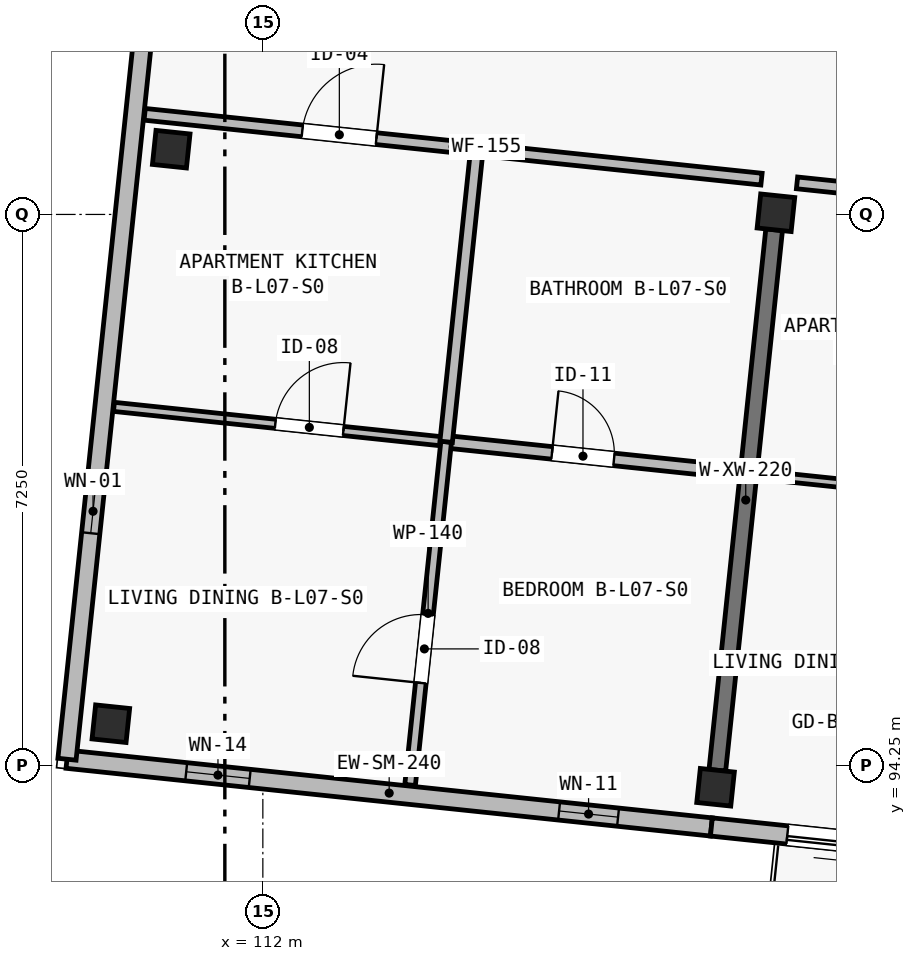
"""IFC4 building model, lengths in metres.
Left out: names, types, materials, properties, quantities, classifications, styles, units other than length and angle.
Written with IfcOpenShell. Run it as: python <this file> out.ifc"""

import sys

from ifc_helpers import new_model, si_unit, direction, frame, frame_2d, origin, origin_2d, place, context, subcontext, project, spatial, rectangle, extrude, element, fill, save


model = new_model("IFC4")
c1 = context("Model", 3, precision=1e-05, world=origin(), true_north=direction((0.0, 1.0)))
c2 = subcontext(c1, "Body", "Model", "MODEL_VIEW")
j1 = project(units=[si_unit("LENGTHUNIT", "METRE"), si_unit("PLANEANGLEUNIT", "RADIAN")], contexts=[c1])
p1 = place(None, origin())
s1 = spatial("IfcSite", under=j1, at=p1, CompositionType="ELEMENT")
p2 = place(p1, origin())
s2 = spatial("IfcBuilding", under=s1, at=p2, CompositionType="ELEMENT")
p3 = place(p2, frame((0.0, 0.0, 24.65)))
s3 = spatial("IfcBuildingStorey", under=s2, at=p3, CompositionType="ELEMENT", Elevation=24.65)
for number, where, z_axis, x_axis in (
    (1, (110.0, 94.8, 0.0), (0.0, 0.0, 1.0), (0.995, -0.105, 0.0)),
    (2, (110.794, 102.358, 0.0), (0.0, 0.0, 1.0), (0.995, -0.105, 0.0)),
    (3, (117.956, 93.964, 0.0), (0.0, 0.0, 1.0), (0.995, -0.105, 0.0)),
    (4, (118.75, 101.522, 0.0), (0.0, 0.0, 1.0), (0.995, -0.105, 0.0)),
):
    element("IfcColumn", number, at=place(p3, frame(where, z_axis=z_axis, x_axis=x_axis)), inside=s3, PredefinedType="COLUMN", context=c2, shape_type="SweptSolid", body=[
        extrude(rectangle(XDim=0.45, YDim=0.45, at=origin_2d()), origin(), (0.0, 0.0, 1.0), 3.25),
    ])
p4 = place(p3, frame((117.98, 94.188, 0.0), z_axis=(0.0, 0.0, 1.0), x_axis=(0.104519481265, 0.994522839374, 0.0)))
e5 = element("IfcWall", 5, at=p4, inside=s3, PredefinedType="SHEAR", context=c2, shape_type="SweptSolid", body=[
    extrude(rectangle(XDim=7.15, YDim=0.22, at=frame_2d((3.575, 0.0))), origin(), (0.0, 0.0, 1.0), 2.5),
])
p5 = place(p3, frame((117.901, 93.442, 0.0), z_axis=(0.0, 0.0, 1.0), x_axis=(-0.994521760736, 0.104529744196, 0.0)))
e6 = element("IfcWall", 6, at=p5, inside=s3, PredefinedType="SOLIDWALL", context=c2, shape_type="SweptSolid", body=[
    extrude(rectangle(XDim=8.525, YDim=0.24, at=frame_2d((4.262, 0.0))), origin(), (0.0, 0.0, 1.0), 3.0),
])
p6 = place(p5, frame((1.235, 0.0, 0.48)))
e7 = element("IfcOpeningElement", 7, at=p6, cuts=e6, PredefinedType="OPENING", context=c2, shape_type="SweptSolid", body=[
    extrude(rectangle(XDim=0.78, YDim=2.2, at=frame_2d((0.39, 1.1))), frame((0.0, 0.135, 0.0), z_axis=(0.0, -1.0, 0.0), x_axis=(1.0, 0.0, 0.0)), (0.0, 0.0, 1.0), 0.27),
])
p7 = place(p5, frame((6.108, 0.0, 0.48)))
e8 = element("IfcOpeningElement", 8, at=p7, cuts=e6, PredefinedType="OPENING", context=c2, shape_type="SweptSolid", body=[
    extrude(rectangle(XDim=0.84, YDim=2.28, at=frame_2d((0.42, 1.14))), frame((0.0, 0.135, 0.0), z_axis=(0.0, -1.0, 0.0), x_axis=(1.0, 0.0, 0.0)), (0.0, 0.0, 1.0), 0.27),
])
p8 = place(p3, frame((125.857, 92.605, 0.0), z_axis=(0.0, 0.0, 1.0), x_axis=(-0.994522329422, 0.104524333444, 0.0)))
e9 = element("IfcWall", 9, at=p8, inside=s3, PredefinedType="SOLIDWALL", context=c2, shape_type="SweptSolid", body=[
    extrude(rectangle(XDim=8.0, YDim=0.24, at=frame_2d((4.0, 0.0))), origin(), (0.0, 0.0, 1.0), 3.0),
])
p9 = place(p8, frame((5.495, 0.0, 0.0)))
e10 = element("IfcOpeningElement", 10, at=p9, cuts=e9, PredefinedType="OPENING", context=c2, shape_type="SweptSolid", body=[
    extrude(rectangle(XDim=1.5, YDim=2.12, at=frame_2d((0.75, 1.06))), frame((0.0, 0.135, 0.0), z_axis=(0.0, -1.0, 0.0), x_axis=(1.0, 0.0, 0.0)), (0.0, 0.0, 1.0), 0.27),
])
p10 = place(p8, frame((0.63, 0.0, 0.5)))
e11 = element("IfcOpeningElement", 11, at=p10, cuts=e9, PredefinedType="OPENING", context=c2, shape_type="SweptSolid", body=[
    extrude(rectangle(XDim=0.86, YDim=2.36, at=frame_2d((0.43, 1.18))), frame((0.0, 0.135, 0.0), z_axis=(0.0, -1.0, 0.0), x_axis=(1.0, 0.0, 0.0)), (0.0, 0.0, 1.0), 0.27),
])
p11 = place(p3, frame((109.423, 94.333, 0.0), z_axis=(0.0, 0.0, 1.0), x_axis=(0.1045253859, 0.994522218808, 0.0)))
e12 = element("IfcWall", 12, at=p11, inside=s3, PredefinedType="SOLIDWALL", context=c2, shape_type="SweptSolid", body=[
    extrude(rectangle(XDim=20.65, YDim=0.24, at=frame_2d((10.325, 0.0))), origin(), (0.0, 0.0, 1.0), 3.0),
])
p12 = place(p11, frame((2.99, 0.0, 0.52)))
e13 = element("IfcOpeningElement", 13, at=p12, cuts=e12, PredefinedType="OPENING", context=c2, shape_type="SweptSolid", body=[
    extrude(rectangle(XDim=0.58, YDim=2.16, at=frame_2d((0.29, 1.08))), frame((0.0, 0.135, 0.0), z_axis=(0.0, -1.0, 0.0), x_axis=(1.0, 0.0, 0.0)), (0.0, 0.0, 1.0), 0.27),
])
p13 = place(p11, frame((17.3, 0.0, 0.45)))
e14 = element("IfcOpeningElement", 14, at=p13, cuts=e12, PredefinedType="OPENING", context=c2, shape_type="SweptSolid", body=[
    extrude(rectangle(XDim=0.72, YDim=2.16, at=frame_2d((0.36, 1.08))), frame((0.0, 0.135, 0.0), z_axis=(0.0, -1.0, 0.0), x_axis=(1.0, 0.0, 0.0)), (0.0, 0.0, 1.0), 0.27),
])
p14 = place(p3, frame((110.446, 102.817, 0.0), z_axis=(0.0, 0.0, 1.0), x_axis=(0.994520852686, -0.104538383252, 0.0)))
e15 = element("IfcWall", 15, at=p14, inside=s3, PredefinedType="PARTITIONING", context=c2, shape_type="SweptSolid", body=[
    extrude(rectangle(XDim=8.16, YDim=0.155, at=frame_2d((4.08, 0.0))), origin(), (0.0, 0.0, 1.0), 2.97),
])
p15 = place(p14, frame((2.085, 0.0, 0.0)))
e16 = element("IfcOpeningElement", 16, at=p15, cuts=e15, PredefinedType="OPENING", context=c2, shape_type="SweptSolid", body=[
    extrude(rectangle(XDim=0.98, YDim=2.15, at=frame_2d((0.49, 1.075))), frame((0.0, 0.093, 0.0), z_axis=(0.0, -1.0, 0.0), x_axis=(1.0, 0.0, 0.0)), (0.0, 0.0, 1.0), 0.185),
])
p16 = place(p3, frame((110.041, 98.969, 0.0), z_axis=(0.0, 0.0, 1.0), x_axis=(0.99452005377, -0.104545983421, 0.0)))
e17 = element("IfcWall", 17, at=p16, inside=s3, PredefinedType="PARTITIONING", context=c2, shape_type="SweptSolid", body=[
    extrude(rectangle(XDim=4.395, YDim=0.12, at=frame_2d((2.198, 0.0))), origin(), (0.0, 0.0, 1.0), 2.97),
])
p17 = place(p16, frame((2.135, 0.0, 0.0)))
e18 = element("IfcOpeningElement", 18, at=p17, cuts=e17, PredefinedType="OPENING", context=c2, shape_type="SweptSolid", body=[
    extrude(rectangle(XDim=0.9, YDim=2.1, at=frame_2d((0.45, 1.05))), frame((0.0, 0.075, 0.0), z_axis=(0.0, -1.0, 0.0), x_axis=(1.0, 0.0, 0.0)), (0.0, 0.0, 1.0), 0.15),
])
p18 = place(p3, frame((114.412, 98.509, 0.0), z_axis=(0.0, 0.0, 1.0), x_axis=(0.994524375082, -0.104504867671, 0.0)))
e19 = element("IfcWall", 19, at=p18, inside=s3, PredefinedType="PLUMBINGWALL", context=c2, shape_type="SweptSolid", body=[
    extrude(rectangle(XDim=3.885, YDim=0.165, at=frame_2d((1.942, 0.0))), origin(), (0.0, 0.0, 1.0), 2.97),
])
p19 = place(p18, frame((1.4, 0.0, 0.0)))
e20 = element("IfcOpeningElement", 20, at=p19, cuts=e19, PredefinedType="OPENING", context=c2, shape_type="SweptSolid", body=[
    extrude(rectangle(XDim=0.82, YDim=2.08, at=frame_2d((0.41, 1.04))), frame((0.0, 0.097, 0.0), z_axis=(0.0, -1.0, 0.0), x_axis=(1.0, 0.0, 0.0)), (0.0, 0.0, 1.0), 0.195),
])
p20 = place(p3, frame((113.937, 93.994, 0.0), z_axis=(0.0, 0.0, 1.0), x_axis=(0.104544812834, 0.994520176824, 0.0)))
e21 = element("IfcWall", 21, at=p20, inside=s3, PredefinedType="PARTITIONING", context=c2, shape_type="SweptSolid", body=[
    extrude(rectangle(XDim=4.54, YDim=0.14, at=frame_2d((2.27, 0.0))), origin(), (0.0, 0.0, 1.0), 2.97),
])
p21 = place(p20, frame((1.35, 0.0, 0.0)))
e22 = element("IfcOpeningElement", 22, at=p21, cuts=e21, PredefinedType="OPENING", context=c2, shape_type="SweptSolid", body=[
    extrude(rectangle(XDim=0.9, YDim=2.1, at=frame_2d((0.45, 1.05))), frame((0.0, 0.085, 0.0), z_axis=(0.0, -1.0, 0.0), x_axis=(1.0, 0.0, 0.0)), (0.0, 0.0, 1.0), 0.17),
])
p22 = place(p3, frame((114.412, 98.509, 0.0), z_axis=(0.0, 0.0, 1.0), x_axis=(0.104530443122, 0.994521687275, 0.0)))
e23 = element("IfcWall", 23, at=p22, inside=s3, PredefinedType="PLUMBINGWALL", context=c2, shape_type="SweptSolid", body=[
    extrude(rectangle(XDim=3.87, YDim=0.165, at=frame_2d((1.935, 0.0))), origin(), (0.0, 0.0, 1.0), 2.97),
])
p23 = place(p3, frame((119.028, 101.915, 0.0), z_axis=(0.0, 0.0, 1.0), x_axis=(0.994521430918, -0.10453288212, 0.0)))
e24 = element("IfcWall", 24, at=p23, inside=s3, PredefinedType="PARTITIONING", context=c2, shape_type="SweptSolid", body=[
    extrude(rectangle(XDim=7.53, YDim=0.155, at=frame_2d((3.765, 0.0))), origin(), (0.0, 0.0, 1.0), 2.97),
])
p24 = place(p23, frame((1.455, 0.0, 0.0)))
e25 = element("IfcOpeningElement", 25, at=p24, cuts=e24, PredefinedType="OPENING", context=c2, shape_type="SweptSolid", body=[
    extrude(rectangle(XDim=1.02, YDim=2.2, at=frame_2d((0.51, 1.1))), frame((0.0, 0.093, 0.0), z_axis=(0.0, -1.0, 0.0), x_axis=(1.0, 0.0, 0.0)), (0.0, 0.0, 1.0), 0.185),
])
p25 = place(p3, frame((118.504, 98.079, 0.0), z_axis=(0.0, 0.0, 1.0), x_axis=(0.994517841934, -0.104567021925, 0.0)))
e26 = element("IfcWall", 26, at=p25, inside=s3, PredefinedType="PARTITIONING", context=c2, shape_type="SweptSolid", body=[
    extrude(rectangle(XDim=3.885, YDim=0.11, at=frame_2d((1.942, 0.0))), origin(), (0.0, 0.0, 1.0), 2.97),
])
p26 = place(p25, frame((1.625, 0.0, 0.0)))
e27 = element("IfcOpeningElement", 27, at=p26, cuts=e26, PredefinedType="OPENING", context=c2, shape_type="SweptSolid", body=[
    extrude(rectangle(XDim=0.9, YDim=2.1, at=frame_2d((0.45, 1.05))), frame((0.0, 0.07, 0.0), z_axis=(0.0, -1.0, 0.0), x_axis=(1.0, 0.0, 0.0)), (0.0, 0.0, 1.0), 0.14),
])
p27 = place(p3, frame((119.402, 103.988, 0.0), z_axis=(0.0, 0.0, 1.0), x_axis=(0.994522671024, -0.104521083137, 0.0)))
e28 = element("IfcWall", 28, at=p27, inside=s3, PredefinedType="PARTITIONING", context=c2, shape_type="SweptSolid", body=[
    extrude(rectangle(XDim=7.22, YDim=0.155, at=frame_2d((3.61, 0.0))), origin(), (0.0, 0.0, 1.0), 2.97),
])
p28 = place(p27, frame((1.305, 0.0, 0.0)))
e29 = element("IfcOpeningElement", 29, at=p28, cuts=e28, PredefinedType="OPENING", context=c2, shape_type="SweptSolid", body=[
    extrude(rectangle(XDim=1.02, YDim=2.2, at=frame_2d((0.51, 1.1))), frame((0.0, 0.093, 0.0), z_axis=(0.0, -1.0, 0.0), x_axis=(1.0, 0.0, 0.0)), (0.0, 0.0, 1.0), 0.185),
])
p29 = place(p6, origin())
e30 = element("IfcWindow", 30, at=p29, inside=s3, PartitioningType="SINGLE_PANEL", PredefinedType="WINDOW", context=c2, shape_type="SweptSolid", body=[
    extrude(rectangle(XDim=0.78, YDim=2.2, at=frame_2d((0.39, 1.1))), frame((0.0, 0.03, 0.0), z_axis=(0.0, -1.0, 0.0), x_axis=(1.0, 0.0, 0.0)), (0.0, 0.0, 1.0), 0.06),
])
fill(e7, e30)
p30 = place(p7, origin())
e31 = element("IfcWindow", 31, at=p30, inside=s3, PartitioningType="SINGLE_PANEL", PredefinedType="WINDOW", context=c2, shape_type="SweptSolid", body=[
    extrude(rectangle(XDim=0.84, YDim=2.28, at=frame_2d((0.42, 1.14))), frame((0.0, 0.03, 0.0), z_axis=(0.0, -1.0, 0.0), x_axis=(1.0, 0.0, 0.0)), (0.0, 0.0, 1.0), 0.06),
])
fill(e8, e31)
p31 = place(p9, origin())
e32 = element("IfcDoor", 32, at=p31, inside=s3, OperationType="SLIDING_TO_RIGHT", PredefinedType="DOOR", context=c2, shape_type="SweptSolid", body=[
    extrude(rectangle(XDim=1.5, YDim=2.12, at=frame_2d((0.75, 1.06))), frame((0.0, 0.025, 0.0), z_axis=(0.0, -1.0, 0.0), x_axis=(1.0, 0.0, 0.0)), (0.0, 0.0, 1.0), 0.05),
])
fill(e10, e32)
p32 = place(p12, origin())
e33 = element("IfcWindow", 33, at=p32, inside=s3, PartitioningType="SINGLE_PANEL", PredefinedType="WINDOW", context=c2, shape_type="SweptSolid", body=[
    extrude(rectangle(XDim=0.58, YDim=2.16, at=frame_2d((0.29, 1.08))), frame((0.0, 0.03, 0.0), z_axis=(0.0, -1.0, 0.0), x_axis=(1.0, 0.0, 0.0)), (0.0, 0.0, 1.0), 0.06),
])
fill(e13, e33)
p33 = place(p15, origin())
e34 = element("IfcDoor", 34, at=p33, inside=s3, OperationType="SINGLE_SWING_RIGHT", PredefinedType="DOOR", context=c2, shape_type="SweptSolid", body=[
    extrude(rectangle(XDim=0.98, YDim=2.15, at=frame_2d((0.49, 1.075))), frame((0.0, 0.025, 0.0), z_axis=(0.0, -1.0, 0.0), x_axis=(1.0, 0.0, 0.0)), (0.0, 0.0, 1.0), 0.05),
])
fill(e16, e34)
p34 = place(p17, origin())
e35 = element("IfcDoor", 35, at=p34, inside=s3, OperationType="SINGLE_SWING_RIGHT", PredefinedType="DOOR", context=c2, shape_type="SweptSolid", body=[
    extrude(rectangle(XDim=0.9, YDim=2.1, at=frame_2d((0.45, 1.05))), frame((0.0, 0.025, 0.0), z_axis=(0.0, -1.0, 0.0), x_axis=(1.0, 0.0, 0.0)), (0.0, 0.0, 1.0), 0.05),
])
fill(e18, e35)
p35 = place(p19, origin())
e36 = element("IfcDoor", 36, at=p35, inside=s3, OperationType="SINGLE_SWING_LEFT", PredefinedType="DOOR", context=c2, shape_type="SweptSolid", body=[
    extrude(rectangle(XDim=0.82, YDim=2.08, at=frame_2d((0.41, 1.04))), frame((0.0, 0.025, 0.0), z_axis=(0.0, -1.0, 0.0), x_axis=(1.0, 0.0, 0.0)), (0.0, 0.0, 1.0), 0.05),
])
fill(e20, e36)
p36 = place(p21, origin())
e37 = element("IfcDoor", 37, at=p36, inside=s3, OperationType="SINGLE_SWING_LEFT", PredefinedType="DOOR", context=c2, shape_type="SweptSolid", body=[
    extrude(rectangle(XDim=0.9, YDim=2.1, at=frame_2d((0.45, 1.05))), frame((0.0, 0.025, 0.0), z_axis=(0.0, -1.0, 0.0), x_axis=(1.0, 0.0, 0.0)), (0.0, 0.0, 1.0), 0.05),
])
fill(e22, e37)
save(model, sys.argv[1])
